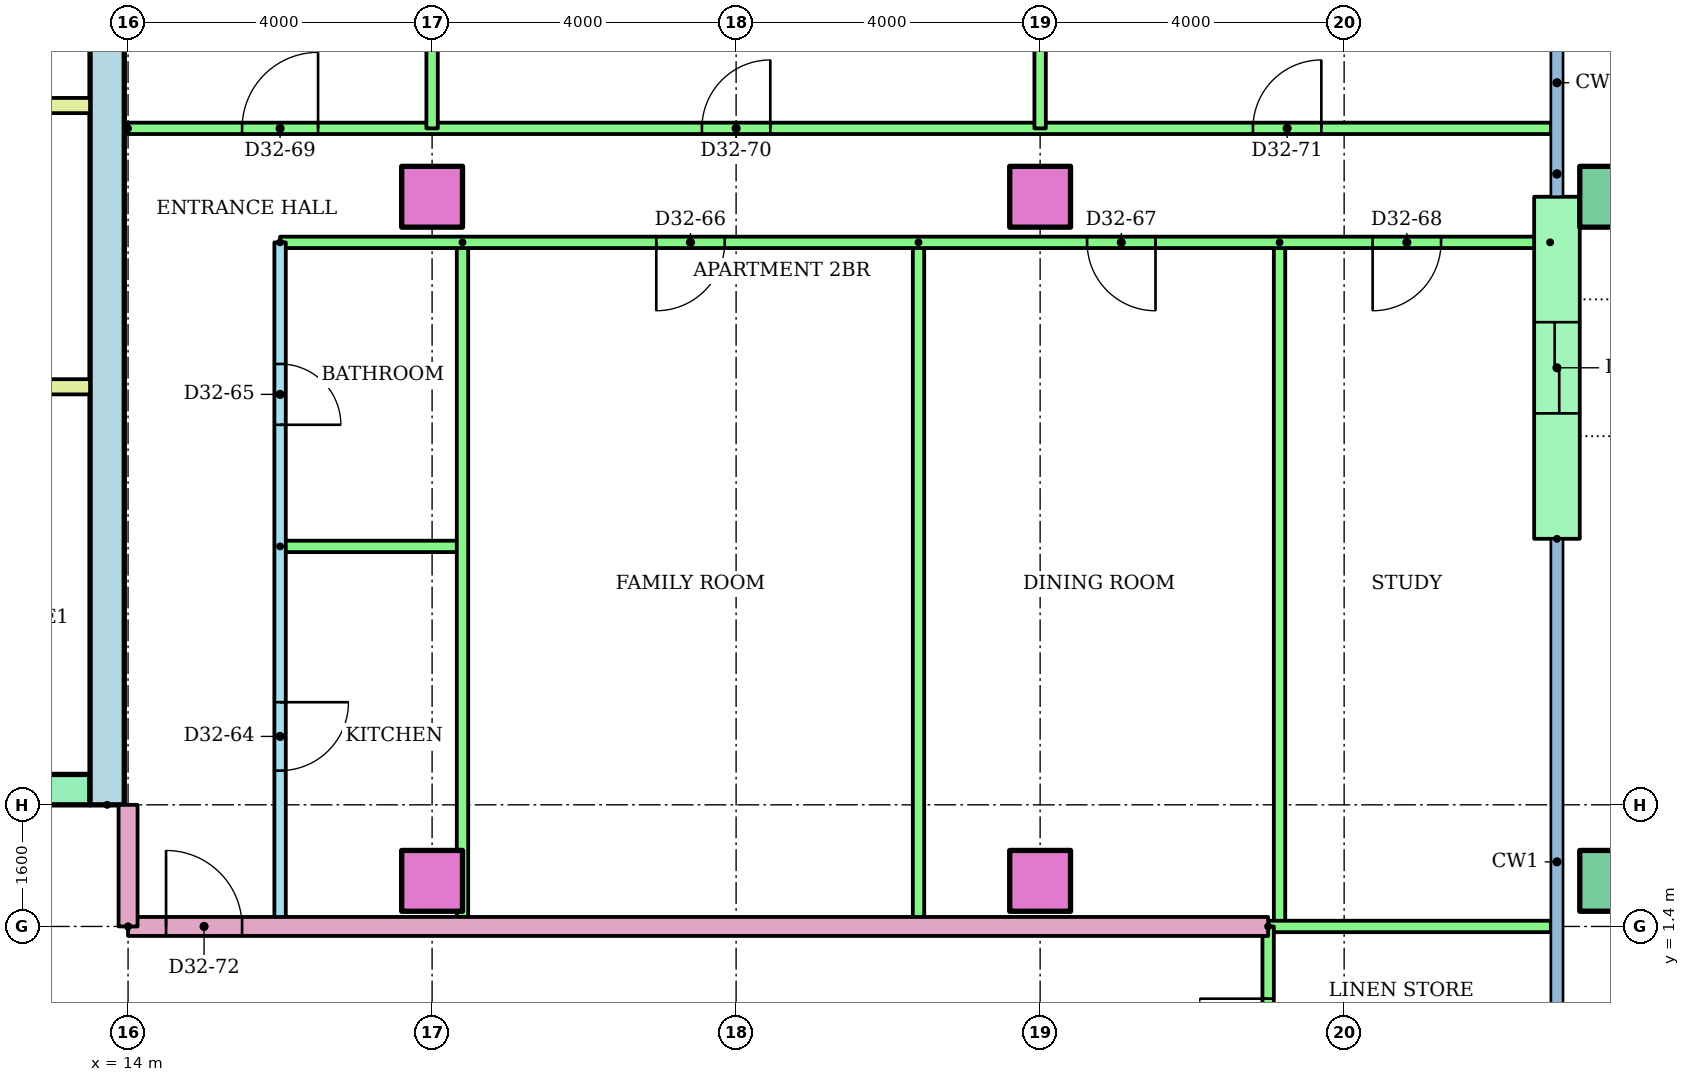
"""IFC4 building model, lengths in metres.
Left out: names, types, materials, properties, quantities, classifications, styles, units other than length and angle.
Written with IfcOpenShell. Run it as: python <this file> out.ifc"""

import sys

from ifc_helpers import new_model, si_unit, direction, frame, frame_2d, origin, origin_2d, place, context, subcontext, project, spatial, rectangle, hollow_rectangle, extrude, element, fill, save


model = new_model("IFC4")
c1 = context("Model", 3, precision=1e-05, world=origin(), true_north=direction((0.0, 1.0)))
c2 = subcontext(c1, "Body", "Model", "MODEL_VIEW")
j1 = project(units=[si_unit("LENGTHUNIT", "METRE"), si_unit("PLANEANGLEUNIT", "RADIAN")], contexts=[c1])
p1 = place(None, origin())
s1 = spatial("IfcSite", under=j1, at=p1, CompositionType="ELEMENT")
p2 = place(p1, origin())
s2 = spatial("IfcBuilding", under=s1, at=p2, CompositionType="ELEMENT")
p3 = place(p2, frame((0.0, 0.0, 126.2)))
s3 = spatial("IfcBuildingStorey", under=s2, at=p3, CompositionType="ELEMENT", Elevation=126.2)
for number, where in (
    (1, (18.0, 2.0, 0.0)),
    (2, (26.0, 2.0, 0.0)),
):
    element("IfcColumn", number, at=place(p3, frame(where)), inside=s3, PredefinedType="COLUMN", context=c2, shape_type="SweptSolid", body=[
        extrude(rectangle(XDim=0.8, YDim=0.8, at=origin_2d()), origin(), (0.0, 0.0, 1.0), 3.2),
    ])
p4 = place(p3, frame((33.5, 2.0, 0.0)))
e3 = element("IfcColumn", 3, at=p4, inside=s3, PredefinedType="COLUMN", context=c2, shape_type="SweptSolid", body=[
    extrude(hollow_rectangle(XDim=0.8, YDim=0.8, WallThickness=0.04, at=origin_2d()), origin(), (0.0, 0.0, 1.0), 3.2),
])
for number, where in (
    (4, (18.0, 11.0, 0.0)),
    (5, (26.0, 11.0, 0.0)),
):
    element("IfcColumn", number, at=place(p3, frame(where)), inside=s3, PredefinedType="COLUMN", context=c2, shape_type="SweptSolid", body=[
        extrude(rectangle(XDim=0.8, YDim=0.8, at=origin_2d()), origin(), (0.0, 0.0, 1.0), 3.2),
    ])
p5 = place(p3, frame((33.5, 11.0, 0.0)))
e6 = element("IfcColumn", 6, at=p5, inside=s3, PredefinedType="COLUMN", context=c2, shape_type="SweptSolid", body=[
    extrude(hollow_rectangle(XDim=0.8, YDim=0.8, WallThickness=0.04, at=origin_2d()), origin(), (0.0, 0.0, 1.0), 3.2),
])
p6 = place(p3, frame((32.8, 6.5, 0.0), z_axis=(0.0, 0.0, 1.0), x_axis=(0.0, 1.0, 0.0)))
e7 = element("IfcWall", 7, at=p6, inside=s3, PredefinedType="STANDARD", context=c2, shape_type="SweptSolid", body=[
    extrude(rectangle(XDim=4.5, YDim=0.6, at=frame_2d((2.25, 0.0))), origin(), (0.0, 0.0, 1.0), 2.92),
])
p7 = place(p6, frame((1.65, 0.0, 0.0)))
e8 = element("IfcOpeningElement", 8, at=p7, cuts=e7, PredefinedType="OPENING", context=c2, shape_type="SweptSolid", body=[
    extrude(rectangle(XDim=1.2, YDim=2.1, at=frame_2d((0.6, 1.05))), frame((0.0, 0.31, 0.0), z_axis=(0.0, -1.0, 0.0), x_axis=(1.0, 0.0, 0.0)), (0.0, 0.0, 1.0), 0.62),
])
p8 = place(p3, frame((13.725, 3.0, 0.0), z_axis=(0.0, 0.0, 1.0), x_axis=(0.0, 1.0, 0.0)))
e9 = element("IfcWall", 9, at=p8, inside=s3, PredefinedType="SHEAR", context=c2, shape_type="SweptSolid", body=[
    extrude(rectangle(XDim=17.0, YDim=0.45, at=frame_2d((8.5, 0.0))), origin(), (0.0, 0.0, 1.0), 2.92),
])
p9 = place(p3, frame((-13.5, 3.2, 0.0)))
e10 = element("IfcWall", 10, at=p9, inside=s3, PredefinedType="SHEAR", context=c2, shape_type="SweptSolid", body=[
    extrude(rectangle(XDim=27.0, YDim=0.4, at=frame_2d((13.5, 0.0))), origin(), (0.0, 0.0, 1.0), 2.92),
])
p10 = place(p9, frame((6.861, 0.0, 0.0)))
e11 = element("IfcOpeningElement", 11, at=p10, cuts=e10, PredefinedType="OPENING", context=c2, shape_type="SweptSolid", body=[
    extrude(rectangle(XDim=1.1, YDim=2.1, at=frame_2d((0.55, 1.05))), frame((0.0, 0.21, 0.0), z_axis=(0.0, -1.0, 0.0), x_axis=(1.0, 0.0, 0.0)), (0.0, 0.0, 1.0), 0.42),
])
p11 = place(p9, frame((9.906, 0.0, 0.0)))
e12 = element("IfcOpeningElement", 12, at=p11, cuts=e10, PredefinedType="OPENING", context=c2, shape_type="SweptSolid", body=[
    extrude(rectangle(XDim=1.1, YDim=2.1, at=frame_2d((0.55, 1.05))), frame((0.0, 0.21, 0.0), z_axis=(0.0, -1.0, 0.0), x_axis=(1.0, 0.0, 0.0)), (0.0, 0.0, 1.0), 0.42),
])
p12 = place(p9, frame((15.994, 0.0, 0.0)))
e13 = element("IfcOpeningElement", 13, at=p12, cuts=e10, PredefinedType="OPENING", context=c2, shape_type="SweptSolid", body=[
    extrude(rectangle(XDim=1.1, YDim=2.1, at=frame_2d((0.55, 1.05))), frame((0.0, 0.21, 0.0), z_axis=(0.0, -1.0, 0.0), x_axis=(1.0, 0.0, 0.0)), (0.0, 0.0, 1.0), 0.42),
])
p13 = place(p9, frame((19.039, 0.0, 0.0)))
e14 = element("IfcOpeningElement", 14, at=p13, cuts=e10, PredefinedType="OPENING", context=c2, shape_type="SweptSolid", body=[
    extrude(rectangle(XDim=1.1, YDim=2.1, at=frame_2d((0.55, 1.05))), frame((0.0, 0.21, 0.0), z_axis=(0.0, -1.0, 0.0), x_axis=(1.0, 0.0, 0.0)), (0.0, 0.0, 1.0), 0.42),
])
p14 = place(p9, frame((12.6, 0.0, 0.0)))
e15 = element("IfcOpeningElement", 15, at=p14, cuts=e10, PredefinedType="OPENING", context=c2, shape_type="SweptSolid", body=[
    extrude(rectangle(XDim=1.8, YDim=2.1, at=frame_2d((0.9, 1.05))), frame((0.0, 0.21, 0.0), z_axis=(0.0, -1.0, 0.0), x_axis=(1.0, 0.0, 0.0)), (0.0, 0.0, 1.0), 0.42),
])
for number, where in (
    (16, (9.6, 8.5, 0.0)),
    (17, (9.6, 12.2, 0.0)),
):
    element("IfcWall", number, at=place(p3, frame(where)), inside=s3, PredefinedType="PARTITIONING", context=c2, shape_type="SweptSolid", body=[
        extrude(rectangle(XDim=3.9, YDim=0.2, at=frame_2d((1.95, 0.0))), origin(), (0.0, 0.0, 1.0), 2.92),
    ])
p15 = place(p3, frame((16.0, 10.4, 0.0), z_axis=(0.0, 0.0, 1.0), x_axis=(0.0, -1.0, 0.0)))
e18 = element("IfcWall", 18, at=p15, inside=s3, PredefinedType="PARTITIONING", context=c2, shape_type="SweptSolid", body=[
    extrude(rectangle(XDim=9.0, YDim=0.15, at=frame_2d((4.5, 0.0))), origin(), (0.0, 0.0, 1.0), 2.4),
])
p16 = place(p15, frame((6.05, 0.0, 0.0)))
e19 = element("IfcOpeningElement", 19, at=p16, cuts=e18, PredefinedType="OPENING", context=c2, shape_type="SweptSolid", body=[
    extrude(rectangle(XDim=0.9, YDim=2.1, at=frame_2d((0.45, 1.05))), frame((0.0, 0.085, 0.0), z_axis=(0.0, -1.0, 0.0), x_axis=(1.0, 0.0, 0.0)), (0.0, 0.0, 1.0), 0.17),
])
p17 = place(p15, frame((1.6, 0.0, 0.0)))
e20 = element("IfcOpeningElement", 20, at=p17, cuts=e18, PredefinedType="OPENING", context=c2, shape_type="SweptSolid", body=[
    extrude(rectangle(XDim=0.8, YDim=2.1, at=frame_2d((0.4, 1.05))), frame((0.0, 0.085, 0.0), z_axis=(0.0, -1.0, 0.0), x_axis=(1.0, 0.0, 0.0)), (0.0, 0.0, 1.0), 0.17),
])
p18 = place(p3, frame((16.0, 6.4, 0.0)))
e21 = element("IfcWall", 21, at=p18, inside=s3, PredefinedType="PARTITIONING", context=c2, shape_type="SweptSolid", body=[
    extrude(rectangle(XDim=2.4, YDim=0.15, at=frame_2d((1.2, 0.0))), origin(), (0.0, 0.0, 1.0), 2.4),
])
for number, where, z_axis, x_axis in (
    (22, (18.4, 10.4, 0.0), (0.0, 0.0, 1.0), (0.0, -1.0, 0.0)),
    (23, (24.4, 10.4, 0.0), (0.0, 0.0, 1.0), (0.0, -1.0, 0.0)),
    (24, (29.15, 10.4, 0.0), (0.0, 0.0, 1.0), (0.0, -1.0, 0.0)),
):
    element("IfcWall", number, at=place(p3, frame(where, z_axis=z_axis, x_axis=x_axis)), inside=s3, PredefinedType="PARTITIONING", context=c2, shape_type="SweptSolid", body=[
        extrude(rectangle(XDim=9.0, YDim=0.15, at=frame_2d((4.5, 0.0))), origin(), (0.0, 0.0, 1.0), 2.4),
    ])
p19 = place(p3, frame((32.71, 10.4, 0.0), z_axis=(0.0, 0.0, 1.0), x_axis=(-1.0, 0.0, 0.0)))
e25 = element("IfcWall", 25, at=p19, inside=s3, PredefinedType="PARTITIONING", context=c2, shape_type="SweptSolid", body=[
    extrude(rectangle(XDim=16.71, YDim=0.15, at=frame_2d((8.355, 0.0))), origin(), (0.0, 0.0, 1.0), 2.4),
])
p20 = place(p19, frame((10.86, 0.0, 0.0)))
e26 = element("IfcOpeningElement", 26, at=p20, cuts=e25, PredefinedType="OPENING", context=c2, shape_type="SweptSolid", body=[
    extrude(rectangle(XDim=0.9, YDim=2.1, at=frame_2d((0.45, 1.05))), frame((0.0, 0.085, 0.0), z_axis=(0.0, -1.0, 0.0), x_axis=(1.0, 0.0, 0.0)), (0.0, 0.0, 1.0), 0.17),
])
p21 = place(p19, frame((5.192, 0.0, 0.0)))
e27 = element("IfcOpeningElement", 27, at=p21, cuts=e25, PredefinedType="OPENING", context=c2, shape_type="SweptSolid", body=[
    extrude(rectangle(XDim=0.9, YDim=2.1, at=frame_2d((0.45, 1.05))), frame((0.0, 0.085, 0.0), z_axis=(0.0, -1.0, 0.0), x_axis=(1.0, 0.0, 0.0)), (0.0, 0.0, 1.0), 0.17),
])
p22 = place(p19, frame((1.435, 0.0, 0.0)))
e28 = element("IfcOpeningElement", 28, at=p22, cuts=e25, PredefinedType="OPENING", context=c2, shape_type="SweptSolid", body=[
    extrude(rectangle(XDim=0.9, YDim=2.1, at=frame_2d((0.45, 1.05))), frame((0.0, 0.085, 0.0), z_axis=(0.0, -1.0, 0.0), x_axis=(1.0, 0.0, 0.0)), (0.0, 0.0, 1.0), 0.17),
])
p23 = place(p3, frame((14.0, 11.9, 0.0)))
e29 = element("IfcWall", 29, at=p23, inside=s3, PredefinedType="PARTITIONING", context=c2, shape_type="SweptSolid", body=[
    extrude(rectangle(XDim=18.72, YDim=0.15, at=frame_2d((9.36, 0.0))), origin(), (0.0, 0.0, 1.0), 2.4),
])
p24 = place(p23, frame((1.5, 0.0, 0.0)))
e30 = element("IfcOpeningElement", 30, at=p24, cuts=e29, PredefinedType="OPENING", context=c2, shape_type="SweptSolid", body=[
    extrude(rectangle(XDim=1.0, YDim=2.1, at=frame_2d((0.5, 1.05))), frame((0.0, 0.085, 0.0), z_axis=(0.0, -1.0, 0.0), x_axis=(1.0, 0.0, 0.0)), (0.0, 0.0, 1.0), 0.17),
])
p25 = place(p23, frame((7.55, 0.0, 0.0)))
e31 = element("IfcOpeningElement", 31, at=p25, cuts=e29, PredefinedType="OPENING", context=c2, shape_type="SweptSolid", body=[
    extrude(rectangle(XDim=0.9, YDim=2.1, at=frame_2d((0.45, 1.05))), frame((0.0, 0.085, 0.0), z_axis=(0.0, -1.0, 0.0), x_axis=(1.0, 0.0, 0.0)), (0.0, 0.0, 1.0), 0.17),
])
p26 = place(p23, frame((14.8, 0.0, 0.0)))
e32 = element("IfcOpeningElement", 32, at=p26, cuts=e29, PredefinedType="OPENING", context=c2, shape_type="SweptSolid", body=[
    extrude(rectangle(XDim=0.9, YDim=2.1, at=frame_2d((0.45, 1.05))), frame((0.0, 0.085, 0.0), z_axis=(0.0, -1.0, 0.0), x_axis=(1.0, 0.0, 0.0)), (0.0, 0.0, 1.0), 0.17),
])
for number, where, z_axis, x_axis in (
    (33, (18.0, 18.721, 0.0), (0.0, 0.0, 1.0), (0.0, -1.0, 0.0)),
    (34, (26.0, 18.721, 0.0), (0.0, 0.0, 1.0), (0.0, -1.0, 0.0)),
):
    element("IfcWall", number, at=place(p3, frame(where, z_axis=z_axis, x_axis=x_axis)), inside=s3, PredefinedType="PARTITIONING", context=c2, shape_type="SweptSolid", body=[
        extrude(rectangle(XDim=6.821, YDim=0.15, at=frame_2d((3.411, 0.0))), origin(), (0.0, 0.0, 1.0), 2.4),
    ])
p27 = place(p3, frame((14.0, 1.4, 0.0)))
e35 = element("IfcWall", 35, at=p27, inside=s3, PredefinedType="PARTITIONING", context=c2, shape_type="SweptSolid", body=[
    extrude(rectangle(XDim=15.0, YDim=0.25, at=frame_2d((7.5, 0.0))), origin(), (0.0, 0.0, 1.0), 2.4),
])
p28 = place(p27, frame((0.5, 0.0, 0.0)))
e36 = element("IfcOpeningElement", 36, at=p28, cuts=e35, PredefinedType="OPENING", context=c2, shape_type="SweptSolid", body=[
    extrude(rectangle(XDim=1.0, YDim=2.1, at=frame_2d((0.5, 1.05))), frame((0.0, 0.135, 0.0), z_axis=(0.0, -1.0, 0.0), x_axis=(1.0, 0.0, 0.0)), (0.0, 0.0, 1.0), 0.27),
])
p29 = place(p3, frame((29.0, 1.4, 0.0)))
e37 = element("IfcWall", 37, at=p29, inside=s3, PredefinedType="PARTITIONING", context=c2, shape_type="SweptSolid", body=[
    extrude(rectangle(XDim=3.72, YDim=0.15, at=frame_2d((1.86, 0.0))), origin(), (0.0, 0.0, 1.0), 2.4),
])
p30 = place(p3, frame((29.0, -1.4, 0.0), z_axis=(0.0, 0.0, 1.0), x_axis=(0.0, 1.0, 0.0)))
e38 = element("IfcWall", 38, at=p30, inside=s3, PredefinedType="PARTITIONING", context=c2, shape_type="SweptSolid", body=[
    extrude(rectangle(XDim=2.8, YDim=0.15, at=frame_2d((1.4, 0.0))), origin(), (0.0, 0.0, 1.0), 2.4),
])
p31 = place(p30, frame((0.95, 0.0, 0.0)))
e39 = element("IfcOpeningElement", 39, at=p31, cuts=e38, PredefinedType="OPENING", context=c2, shape_type="SweptSolid", body=[
    extrude(rectangle(XDim=0.9, YDim=2.1, at=frame_2d((0.45, 1.05))), frame((0.0, 0.085, 0.0), z_axis=(0.0, -1.0, 0.0), x_axis=(1.0, 0.0, 0.0)), (0.0, 0.0, 1.0), 0.17),
])
p32 = place(p3, frame((14.0, 1.4, 0.0), z_axis=(0.0, 0.0, 1.0), x_axis=(0.0, 1.0, 0.0)))
e40 = element("IfcWall", 40, at=p32, inside=s3, PredefinedType="PARTITIONING", context=c2, shape_type="SweptSolid", body=[
    extrude(rectangle(XDim=1.6, YDim=0.25, at=frame_2d((0.8, 0.0))), origin(), (0.0, 0.0, 1.0), 2.4),
])
p33 = place(p16, origin())
e41 = element("IfcDoor", 41, at=p33, inside=s3, OperationType="SINGLE_SWING_LEFT", PredefinedType="DOOR", context=c2, shape_type="SweptSolid", body=[
    extrude(rectangle(XDim=0.9, YDim=2.1, at=frame_2d((0.45, 1.05))), frame((0.0, 0.025, 0.0), z_axis=(0.0, -1.0, 0.0), x_axis=(1.0, 0.0, 0.0)), (0.0, 0.0, 1.0), 0.05),
])
fill(e19, e41)
p34 = place(p17, origin())
e42 = element("IfcDoor", 42, at=p34, inside=s3, OperationType="SINGLE_SWING_RIGHT", PredefinedType="DOOR", context=c2, shape_type="SweptSolid", body=[
    extrude(rectangle(XDim=0.8, YDim=2.1, at=frame_2d((0.4, 1.05))), frame((0.0, 0.025, 0.0), z_axis=(0.0, -1.0, 0.0), x_axis=(1.0, 0.0, 0.0)), (0.0, 0.0, 1.0), 0.05),
])
fill(e20, e42)
p35 = place(p20, origin())
e43 = element("IfcDoor", 43, at=p35, inside=s3, OperationType="SINGLE_SWING_RIGHT", PredefinedType="DOOR", context=c2, shape_type="SweptSolid", body=[
    extrude(rectangle(XDim=0.9, YDim=2.1, at=frame_2d((0.45, 1.05))), frame((0.0, 0.025, 0.0), z_axis=(0.0, -1.0, 0.0), x_axis=(1.0, 0.0, 0.0)), (0.0, 0.0, 1.0), 0.05),
])
fill(e26, e43)
p36 = place(p21, origin())
e44 = element("IfcDoor", 44, at=p36, inside=s3, OperationType="SINGLE_SWING_LEFT", PredefinedType="DOOR", context=c2, shape_type="SweptSolid", body=[
    extrude(rectangle(XDim=0.9, YDim=2.1, at=frame_2d((0.45, 1.05))), frame((0.0, 0.025, 0.0), z_axis=(0.0, -1.0, 0.0), x_axis=(1.0, 0.0, 0.0)), (0.0, 0.0, 1.0), 0.05),
])
fill(e27, e44)
p37 = place(p22, origin())
e45 = element("IfcDoor", 45, at=p37, inside=s3, OperationType="SINGLE_SWING_RIGHT", PredefinedType="DOOR", context=c2, shape_type="SweptSolid", body=[
    extrude(rectangle(XDim=0.9, YDim=2.1, at=frame_2d((0.45, 1.05))), frame((0.0, 0.025, 0.0), z_axis=(0.0, -1.0, 0.0), x_axis=(1.0, 0.0, 0.0)), (0.0, 0.0, 1.0), 0.05),
])
fill(e28, e45)
p38 = place(p24, origin())
e46 = element("IfcDoor", 46, at=p38, inside=s3, OperationType="SINGLE_SWING_RIGHT", PredefinedType="DOOR", context=c2, shape_type="SweptSolid", body=[
    extrude(rectangle(XDim=1.0, YDim=2.1, at=frame_2d((0.5, 1.05))), frame((0.0, 0.025, 0.0), z_axis=(0.0, -1.0, 0.0), x_axis=(1.0, 0.0, 0.0)), (0.0, 0.0, 1.0), 0.05),
])
fill(e30, e46)
p39 = place(p25, origin())
e47 = element("IfcDoor", 47, at=p39, inside=s3, OperationType="SINGLE_SWING_RIGHT", PredefinedType="DOOR", context=c2, shape_type="SweptSolid", body=[
    extrude(rectangle(XDim=0.9, YDim=2.1, at=frame_2d((0.45, 1.05))), frame((0.0, 0.025, 0.0), z_axis=(0.0, -1.0, 0.0), x_axis=(1.0, 0.0, 0.0)), (0.0, 0.0, 1.0), 0.05),
])
fill(e31, e47)
p40 = place(p26, origin())
e48 = element("IfcDoor", 48, at=p40, inside=s3, OperationType="SINGLE_SWING_RIGHT", PredefinedType="DOOR", context=c2, shape_type="SweptSolid", body=[
    extrude(rectangle(XDim=0.9, YDim=2.1, at=frame_2d((0.45, 1.05))), frame((0.0, 0.025, 0.0), z_axis=(0.0, -1.0, 0.0), x_axis=(1.0, 0.0, 0.0)), (0.0, 0.0, 1.0), 0.05),
])
fill(e32, e48)
p41 = place(p28, origin())
e49 = element("IfcDoor", 49, at=p41, inside=s3, OperationType="SINGLE_SWING_LEFT", PredefinedType="DOOR", context=c2, shape_type="SweptSolid", body=[
    extrude(rectangle(XDim=1.0, YDim=2.1, at=frame_2d((0.5, 1.05))), frame((0.0, 0.025, 0.0), z_axis=(0.0, -1.0, 0.0), x_axis=(1.0, 0.0, 0.0)), (0.0, 0.0, 1.0), 0.05),
])
fill(e36, e49)
p42 = place(p31, origin())
e50 = element("IfcDoor", 50, at=p42, inside=s3, OperationType="SINGLE_SWING_RIGHT", PredefinedType="DOOR", context=c2, shape_type="SweptSolid", body=[
    extrude(rectangle(XDim=0.9, YDim=2.1, at=frame_2d((0.45, 1.05))), frame((0.0, 0.025, 0.0), z_axis=(0.0, -1.0, 0.0), x_axis=(1.0, 0.0, 0.0)), (0.0, 0.0, 1.0), 0.05),
])
fill(e39, e50)
p43 = place(p7, origin())
e51 = element("IfcDoor", 51, at=p43, inside=s3, OperationType="SLIDING_TO_LEFT", PredefinedType="DOOR", context=c2, shape_type="SweptSolid", body=[
    extrude(rectangle(XDim=1.2, YDim=2.1, at=frame_2d((0.6, 1.05))), frame((0.0, 0.025, 0.0), z_axis=(0.0, -1.0, 0.0), x_axis=(1.0, 0.0, 0.0)), (0.0, 0.0, 1.0), 0.05),
])
fill(e8, e51)
save(model, sys.argv[1])
